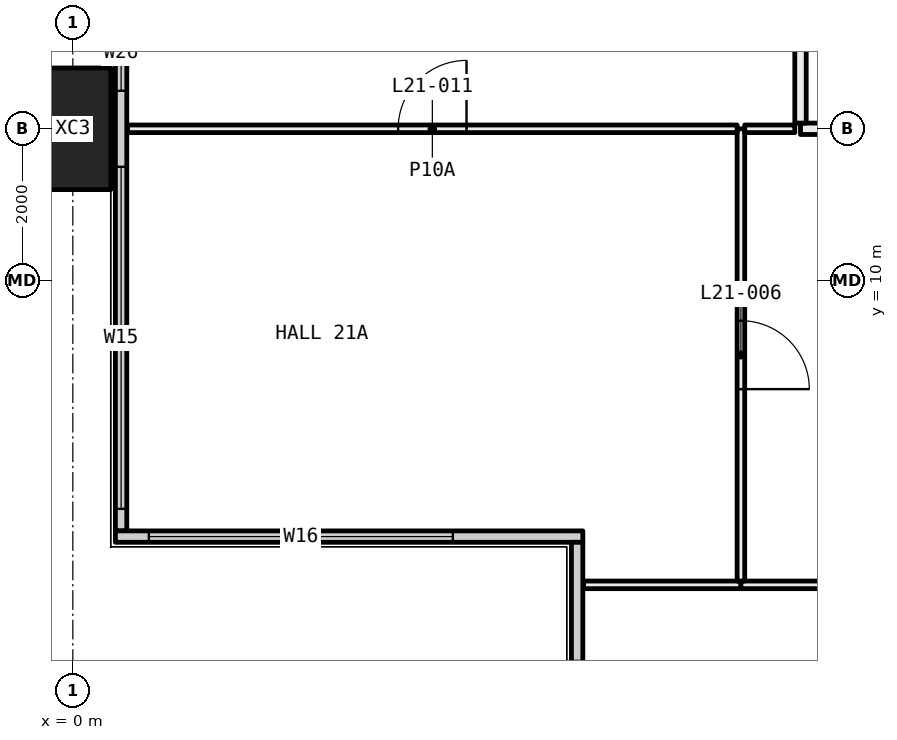
"""IFC4 building model, lengths in metres.
Left out: names, types, materials, properties, quantities, classifications, styles, units other than length and angle.
Written with IfcOpenShell. Run it as: python <this file> out.ifc"""

import sys

from ifc_helpers import new_model, si_unit, direction, frame, frame_2d, origin, origin_2d, place, context, subcontext, project, spatial, rectangle, hollow_rectangle, extrude, element, fill, save


model = new_model("IFC4")
c1 = context("Model", 3, precision=1e-05, world=origin(), true_north=direction((0.0, 1.0)))
c2 = subcontext(c1, "Body", "Model", "MODEL_VIEW")
j1 = project(units=[si_unit("LENGTHUNIT", "METRE"), si_unit("PLANEANGLEUNIT", "RADIAN")], contexts=[c1])
p1 = place(None, origin())
s1 = spatial("IfcSite", under=j1, at=p1, CompositionType="ELEMENT")
p2 = place(p1, origin())
s2 = spatial("IfcBuilding", under=s1, at=p2, CompositionType="ELEMENT")
p3 = place(p2, frame((0.0, 0.0, 85.2)))
s3 = spatial("IfcBuildingStorey", under=s2, at=p3, CompositionType="ELEMENT", Elevation=85.2)
p4 = place(p3, frame((0.0, 12.0, -0.4), z_axis=(0.0, 0.0, 1.0), x_axis=(0.0, 1.0, 0.0)))
e1 = element("IfcColumn", 1, at=p4, inside=s3, PredefinedType="COLUMN", context=c2, shape_type="SweptSolid", body=[
    extrude(hollow_rectangle(XDim=1.6, YDim=1.0, WallThickness=0.065, at=origin_2d()), origin(), (0.0, 0.0, 1.0), 3.45),
])
p5 = place(p3, frame((0.635, 6.71, 0.0), z_axis=(0.0, 0.0, 1.0), x_axis=(0.0, 1.0, 0.0)))
e2 = element("IfcWall", 2, at=p5, inside=s3, PredefinedType="ELEMENTEDWALL", context=c2, shape_type="SweptSolid", body=[
    extrude(rectangle(XDim=34.58, YDim=0.15, at=frame_2d((17.29, 0.0))), origin(), (0.0, 0.0, 1.0), 3.05),
])
p6 = place(p5, frame((0.29, 0.0, 0.45)))
e3 = element("IfcOpeningElement", 3, at=p6, cuts=e2, PredefinedType="OPENING", context=c2, shape_type="SweptSolid", body=[
    extrude(rectangle(XDim=4.5, YDim=2.55, at=frame_2d((2.25, 1.275))), frame((0.0, 0.085, 0.0), z_axis=(0.0, -1.0, 0.0), x_axis=(1.0, 0.0, 0.0)), (0.0, 0.0, 1.0), 0.17),
])
p7 = place(p5, frame((5.79, 0.0, 0.45)))
e4 = element("IfcOpeningElement", 4, at=p7, cuts=e2, PredefinedType="OPENING", context=c2, shape_type="SweptSolid", body=[
    extrude(rectangle(XDim=1.0, YDim=2.55, at=frame_2d((0.5, 1.275))), frame((0.0, 0.085, 0.0), z_axis=(0.0, -1.0, 0.0), x_axis=(1.0, 0.0, 0.0)), (0.0, 0.0, 1.0), 0.17),
])
p8 = place(p5, frame((9.54, 0.0, 0.45)))
e5 = element("IfcOpeningElement", 5, at=p8, cuts=e2, PredefinedType="OPENING", context=c2, shape_type="SweptSolid", body=[
    extrude(rectangle(XDim=1.25, YDim=2.55, at=frame_2d((0.625, 1.275))), frame((0.0, 0.085, 0.0), z_axis=(0.0, -1.0, 0.0), x_axis=(1.0, 0.0, 0.0)), (0.0, 0.0, 1.0), 0.17),
])
p9 = place(p5, frame((11.79, 0.0, 0.45)))
e6 = element("IfcOpeningElement", 6, at=p9, cuts=e2, PredefinedType="OPENING", context=c2, shape_type="SweptSolid", body=[
    extrude(rectangle(XDim=1.25, YDim=2.55, at=frame_2d((0.625, 1.275))), frame((0.0, 0.085, 0.0), z_axis=(0.0, -1.0, 0.0), x_axis=(1.0, 0.0, 0.0)), (0.0, 0.0, 1.0), 0.17),
])
p10 = place(p5, frame((15.79, 0.0, 0.45)))
e7 = element("IfcOpeningElement", 7, at=p10, cuts=e2, PredefinedType="OPENING", context=c2, shape_type="SweptSolid", body=[
    extrude(rectangle(XDim=1.0, YDim=2.55, at=frame_2d((0.5, 1.275))), frame((0.0, 0.085, 0.0), z_axis=(0.0, -1.0, 0.0), x_axis=(1.0, 0.0, 0.0)), (0.0, 0.0, 1.0), 0.17),
])
p11 = place(p5, frame((17.79, 0.0, 0.45)))
e8 = element("IfcOpeningElement", 8, at=p11, cuts=e2, PredefinedType="OPENING", context=c2, shape_type="SweptSolid", body=[
    extrude(rectangle(XDim=1.0, YDim=2.55, at=frame_2d((0.5, 1.275))), frame((0.0, 0.085, 0.0), z_axis=(0.0, -1.0, 0.0), x_axis=(1.0, 0.0, 0.0)), (0.0, 0.0, 1.0), 0.17),
])
p12 = place(p5, frame((21.54, 0.0, 0.45)))
e9 = element("IfcOpeningElement", 9, at=p12, cuts=e2, PredefinedType="OPENING", context=c2, shape_type="SweptSolid", body=[
    extrude(rectangle(XDim=1.25, YDim=2.55, at=frame_2d((0.625, 1.275))), frame((0.0, 0.085, 0.0), z_axis=(0.0, -1.0, 0.0), x_axis=(1.0, 0.0, 0.0)), (0.0, 0.0, 1.0), 0.17),
])
p13 = place(p5, frame((23.79, 0.0, 0.45)))
e10 = element("IfcOpeningElement", 10, at=p13, cuts=e2, PredefinedType="OPENING", context=c2, shape_type="SweptSolid", body=[
    extrude(rectangle(XDim=1.25, YDim=2.55, at=frame_2d((0.625, 1.275))), frame((0.0, 0.085, 0.0), z_axis=(0.0, -1.0, 0.0), x_axis=(1.0, 0.0, 0.0)), (0.0, 0.0, 1.0), 0.17),
])
p14 = place(p5, frame((27.79, 0.0, 0.45)))
e11 = element("IfcOpeningElement", 11, at=p14, cuts=e2, PredefinedType="OPENING", context=c2, shape_type="SweptSolid", body=[
    extrude(rectangle(XDim=1.0, YDim=2.55, at=frame_2d((0.5, 1.275))), frame((0.0, 0.085, 0.0), z_axis=(0.0, -1.0, 0.0), x_axis=(1.0, 0.0, 0.0)), (0.0, 0.0, 1.0), 0.17),
])
p15 = place(p5, frame((29.79, 0.0, 0.45)))
e12 = element("IfcOpeningElement", 12, at=p15, cuts=e2, PredefinedType="OPENING", context=c2, shape_type="SweptSolid", body=[
    extrude(rectangle(XDim=4.5, YDim=2.55, at=frame_2d((2.25, 1.275))), frame((0.0, 0.085, 0.0), z_axis=(0.0, -1.0, 0.0), x_axis=(1.0, 0.0, 0.0)), (0.0, 0.0, 1.0), 0.17),
])
p16 = place(p3, frame((0.56, 6.635, 0.0), z_axis=(0.0, 0.0, 1.0), x_axis=(1.0, 0.0, 0.0)))
e13 = element("IfcWall", 13, at=p16, inside=s3, PredefinedType="ELEMENTEDWALL", context=c2, shape_type="SweptSolid", body=[
    extrude(rectangle(XDim=6.15, YDim=0.15, at=frame_2d((3.075, 0.0))), origin(), (0.0, 0.0, 1.0), 3.05),
])
p17 = place(p16, frame((0.44, 0.0, 0.45)))
e14 = element("IfcOpeningElement", 14, at=p17, cuts=e13, PredefinedType="OPENING", context=c2, shape_type="SweptSolid", body=[
    extrude(rectangle(XDim=4.0, YDim=2.55, at=frame_2d((2.0, 1.275))), frame((0.0, 0.085, 0.0), z_axis=(0.0, -1.0, 0.0), x_axis=(1.0, 0.0, 0.0)), (0.0, 0.0, 1.0), 0.17),
])
p18 = place(p3, frame((6.635, 0.71, 0.0), z_axis=(0.0, 0.0, 1.0), x_axis=(0.0, 1.0, 0.0)))
e15 = element("IfcWall", 15, at=p18, inside=s3, PredefinedType="ELEMENTEDWALL", context=c2, shape_type="SweptSolid", body=[
    extrude(rectangle(XDim=5.85, YDim=0.15, at=frame_2d((2.925, 0.0))), origin(), (0.0, 0.0, 1.0), 3.05),
])
p19 = place(p18, frame((0.29, 0.0, 0.45)))
e16 = element("IfcOpeningElement", 16, at=p19, cuts=e15, PredefinedType="OPENING", context=c2, shape_type="SweptSolid", body=[
    extrude(rectangle(XDim=4.0, YDim=2.55, at=frame_2d((2.0, 1.275))), frame((0.0, 0.085, 0.0), z_axis=(0.0, -1.0, 0.0), x_axis=(1.0, 0.0, 0.0)), (0.0, 0.0, 1.0), 0.17),
])
p20 = place(p3, frame((8.79, 6.0, 0.0), z_axis=(0.0, 0.0, 1.0), x_axis=(-1.0, 0.0, 0.0)))
e17 = element("IfcWall", 17, at=p20, inside=s3, PredefinedType="PARTITIONING", context=c2, shape_type="SweptSolid", body=[
    extrude(rectangle(XDim=2.07, YDim=0.1, at=frame_2d((1.035, 0.0))), origin(), (0.0, 0.0, 1.0), 3.05),
])
p21 = place(p3, frame((11.95, 6.0, 0.0), z_axis=(0.0, 0.0, 1.0), x_axis=(-1.0, 0.0, 0.0)))
e18 = element("IfcWall", 18, at=p21, inside=s3, PredefinedType="PARTITIONING", context=c2, shape_type="SweptSolid", body=[
    extrude(rectangle(XDim=3.16, YDim=0.1, at=frame_2d((1.58, 0.0))), origin(), (0.0, 0.0, 1.0), 2.45),
])
p22 = place(p21, frame((1.13, 0.0, 0.0)))
e19 = element("IfcOpeningElement", 19, at=p22, cuts=e18, PredefinedType="OPENING", context=c2, shape_type="SweptSolid", body=[
    extrude(rectangle(XDim=0.9, YDim=2.1, at=frame_2d((0.45, 1.05))), frame((0.0, 0.06, 0.0), z_axis=(0.0, -1.0, 0.0), x_axis=(1.0, 0.0, 0.0)), (0.0, 0.0, 1.0), 0.12),
])
p23 = place(p3, frame((8.79, 6.05, 0.0), z_axis=(0.0, 0.0, 1.0), x_axis=(0.0, 1.0, 0.0)))
e20 = element("IfcWall", 20, at=p23, inside=s3, PredefinedType="PARTITIONING", context=c2, shape_type="SweptSolid", body=[
    extrude(rectangle(XDim=5.95, YDim=0.1, at=frame_2d((2.975, 0.0))), origin(), (0.0, 0.0, 1.0), 2.45),
])
p24 = place(p23, frame((2.525, 0.0, 0.0)))
e21 = element("IfcOpeningElement", 21, at=p24, cuts=e20, PredefinedType="OPENING", context=c2, shape_type="SweptSolid", body=[
    extrude(rectangle(XDim=0.9, YDim=2.1, at=frame_2d((0.45, 1.05))), frame((0.0, 0.06, 0.0), z_axis=(0.0, -1.0, 0.0), x_axis=(1.0, 0.0, 0.0)), (0.0, 0.0, 1.0), 0.12),
])
p25 = place(p3, frame((8.74, 12.0, 0.0), z_axis=(0.0, 0.0, 1.0), x_axis=(-1.0, 0.0, 0.0)))
e22 = element("IfcWall", 22, at=p25, inside=s3, PredefinedType="PARTITIONING", context=c2, shape_type="SweptSolid", body=[
    extrude(rectangle(XDim=8.02, YDim=0.1, at=frame_2d((4.01, 0.0))), origin(), (0.0, 0.0, 1.0), 2.45),
])
p26 = place(p25, frame((3.56, 0.0, 0.0)))
e23 = element("IfcOpeningElement", 23, at=p26, cuts=e22, PredefinedType="OPENING", context=c2, shape_type="SweptSolid", body=[
    extrude(rectangle(XDim=0.9, YDim=2.1, at=frame_2d((0.45, 1.05))), frame((0.0, 0.06, 0.0), z_axis=(0.0, -1.0, 0.0), x_axis=(1.0, 0.0, 0.0)), (0.0, 0.0, 1.0), 0.12),
])
p27 = place(p3, frame((9.499, 12.0, 0.0), z_axis=(0.0, 0.0, 1.0), x_axis=(-1.0, 0.0, 0.0)))
e24 = element("IfcWall", 24, at=p27, inside=s3, PredefinedType="PARTITIONING", context=c2, shape_type="SweptSolid", body=[
    extrude(rectangle(XDim=0.659, YDim=0.1, at=frame_2d((0.33, 0.0))), origin(), (0.0, 0.0, 1.0), 2.45),
])
p28 = place(p3, frame((11.2, 12.0, 0.0), z_axis=(0.0, 0.0, 1.0), x_axis=(-1.0, 0.0, 0.0)))
e25 = element("IfcWall", 25, at=p28, inside=s3, PredefinedType="PARTITIONING", context=c2, shape_type="SweptSolid", body=[
    extrude(rectangle(XDim=1.626, YDim=0.15, at=frame_2d((0.813, 0.0))), origin(), (0.0, 0.0, 1.0), 2.45),
])
p29 = place(p3, frame((9.574, 12.075, 0.0), z_axis=(0.0, 0.0, 1.0), x_axis=(0.0, 1.0, 0.0)))
e26 = element("IfcWall", 26, at=p29, inside=s3, PredefinedType="PARTITIONING", context=c2, shape_type="SweptSolid", body=[
    extrude(rectangle(XDim=2.925, YDim=0.15, at=frame_2d((1.462, 0.0))), origin(), (0.0, 0.0, 1.0), 2.45),
])
p30 = place(p6, origin())
e27 = element("IfcWindow", 27, at=p30, inside=s3, PartitioningType="SINGLE_PANEL", PredefinedType="WINDOW", context=c2, shape_type="SweptSolid", body=[
    extrude(rectangle(XDim=4.5, YDim=2.55, at=frame_2d((2.25, 1.275))), frame((0.0, 0.03, 0.0), z_axis=(0.0, -1.0, 0.0), x_axis=(1.0, 0.0, 0.0)), (0.0, 0.0, 1.0), 0.06),
])
fill(e3, e27)
p31 = place(p7, origin())
e28 = element("IfcWindow", 28, at=p31, inside=s3, PartitioningType="SINGLE_PANEL", PredefinedType="WINDOW", context=c2, shape_type="SweptSolid", body=[
    extrude(rectangle(XDim=1.0, YDim=2.55, at=frame_2d((0.5, 1.275))), frame((0.0, 0.03, 0.0), z_axis=(0.0, -1.0, 0.0), x_axis=(1.0, 0.0, 0.0)), (0.0, 0.0, 1.0), 0.06),
])
fill(e4, e28)
p32 = place(p17, origin())
e29 = element("IfcWindow", 29, at=p32, inside=s3, PartitioningType="SINGLE_PANEL", PredefinedType="WINDOW", context=c2, shape_type="SweptSolid", body=[
    extrude(rectangle(XDim=4.0, YDim=2.55, at=frame_2d((2.0, 1.275))), frame((0.0, 0.03, 0.0), z_axis=(0.0, -1.0, 0.0), x_axis=(1.0, 0.0, 0.0)), (0.0, 0.0, 1.0), 0.06),
])
fill(e14, e29)
p33 = place(p24, frame((0.9, 0.0, 0.0), x_axis=(-1.0, 0.0, 0.0)))
e30 = element("IfcDoor", 30, at=p33, inside=s3, OperationType="SINGLE_SWING_LEFT", PredefinedType="DOOR", context=c2, shape_type="SweptSolid", body=[
    extrude(rectangle(XDim=0.9, YDim=2.1, at=frame_2d((0.45, 1.05))), frame((0.0, 0.025, 0.0), z_axis=(0.0, -1.0, 0.0), x_axis=(1.0, 0.0, 0.0)), (0.0, 0.0, 1.0), 0.05),
])
fill(e21, e30)
p34 = place(p26, frame((0.9, 0.0, 0.0), x_axis=(-1.0, 0.0, 0.0)))
e31 = element("IfcDoor", 31, at=p34, inside=s3, OperationType="SINGLE_SWING_LEFT", PredefinedType="DOOR", context=c2, shape_type="SweptSolid", body=[
    extrude(rectangle(XDim=0.9, YDim=2.1, at=frame_2d((0.45, 1.05))), frame((0.0, 0.025, 0.0), z_axis=(0.0, -1.0, 0.0), x_axis=(1.0, 0.0, 0.0)), (0.0, 0.0, 1.0), 0.05),
])
fill(e23, e31)
save(model, sys.argv[1])
